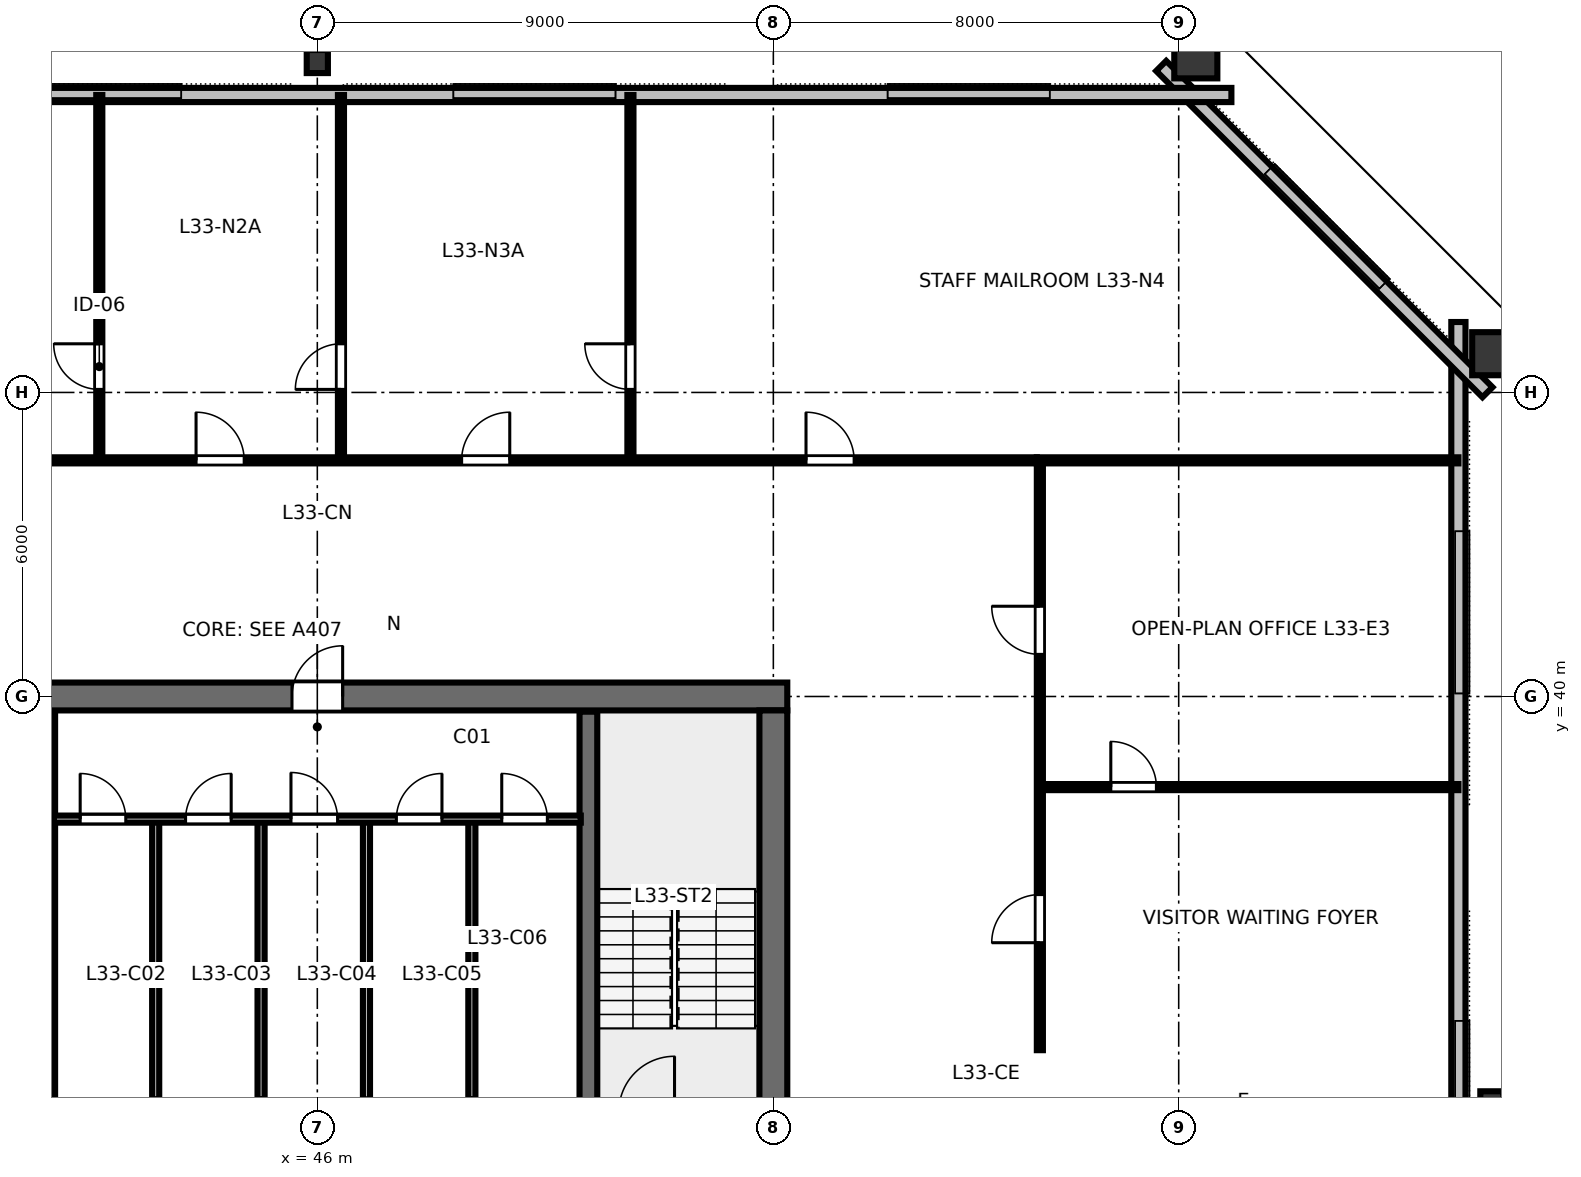
"""IFC4 building model, lengths in metres.
Left out: names, types, materials, properties, quantities, classifications, styles, units other than length and angle.
Written with IfcOpenShell. Run it as: python <this file> out.ifc"""

import sys

from ifc_helpers import new_model, si_unit, direction, frame, frame_2d, origin, origin_2d, place, context, subcontext, project, spatial, rectangle, hollow_rectangle, i_section, extrude, element, fill, save


model = new_model("IFC4")
c1 = context("Model", 3, precision=1e-05, world=origin(), true_north=direction((0.0, 1.0)))
c2 = subcontext(c1, "Body", "Model", "MODEL_VIEW")
j1 = project(units=[si_unit("LENGTHUNIT", "METRE"), si_unit("PLANEANGLEUNIT", "RADIAN")], contexts=[c1])
p1 = place(None, origin())
s1 = spatial("IfcSite", under=j1, at=p1, CompositionType="ELEMENT")
p2 = place(p1, origin())
s2 = spatial("IfcBuilding", under=s1, at=p2, CompositionType="ELEMENT")
p3 = place(p2, frame((0.0, 0.0, 127.6)))
s3 = spatial("IfcBuildingStorey", under=s2, at=p3, CompositionType="ELEMENT", Elevation=127.6)
p4 = place(p3, frame((36.725, 40.0, 0.0), z_axis=(0.0, 0.0, 1.0), x_axis=(1.0, 0.0, 0.0)))
e1 = element("IfcWall", 1, at=p4, inside=s3, PredefinedType="SHEAR", context=c2, shape_type="SweptSolid", body=[
    extrude(rectangle(XDim=18.55, YDim=0.55, at=frame_2d((9.275, 0.0))), origin(), (0.0, 0.0, 1.0), 3.36),
])
p5 = place(p4, frame((8.775, 0.0, 0.0)))
e2 = element("IfcOpeningElement", 2, at=p5, cuts=e1, PredefinedType="OPENING", context=c2, shape_type="SweptSolid", body=[
    extrude(rectangle(XDim=1.0, YDim=2.15, at=frame_2d((0.5, 1.075))), frame((0.0, 0.285, 0.0), z_axis=(0.0, -1.0, 0.0), x_axis=(1.0, 0.0, 0.0)), (0.0, 0.0, 1.0), 0.57),
])
p6 = place(p3, frame((55.0, 24.275, 0.0), z_axis=(0.0, 0.0, 1.0), x_axis=(0.0, 1.0, 0.0)))
e3 = element("IfcWall", 3, at=p6, inside=s3, PredefinedType="SHEAR", context=c2, shape_type="SweptSolid", body=[
    extrude(rectangle(XDim=15.45, YDim=0.55, at=frame_2d((7.725, 0.0))), origin(), (0.0, 0.0, 1.0), 3.36),
])
p7 = place(p6, frame((5.25, 0.0, 0.0)))
e4 = element("IfcOpeningElement", 4, at=p7, cuts=e3, PredefinedType="OPENING", context=c2, shape_type="SweptSolid", body=[
    extrude(rectangle(XDim=1.15, YDim=2.15, at=frame_2d((0.575, 1.075))), frame((0.0, 0.285, 0.0), z_axis=(0.0, -1.0, 0.0), x_axis=(1.0, 0.0, 0.0)), (0.0, 0.0, 1.0), 0.57),
])
p8 = place(p3, frame((69.18, 32.0, 0.0), z_axis=(0.0, 0.0, 1.0), x_axis=(0.0, 1.0, 0.0)))
e5 = element("IfcColumn", 5, at=p8, inside=s3, PredefinedType="COLUMN", context=c2, shape_type="SweptSolid", body=[
    extrude(i_section(OverallWidth=0.418, OverallDepth=0.455, WebThickness=0.042, FlangeThickness=0.068, FilletRadius=0.025, at=origin_2d()), origin(), (0.0, 0.0, 1.0), 3.358),
])
for number, where, z_axis, x_axis in (
    (6, (69.292, 46.764, 0.0), (0.0, 0.0, 1.0), (0.0, 1.0, 0.0)),
    (7, (63.338, 52.698, 0.0), (0.0, 0.0, 1.0), (1.0, 0.0, 0.0)),
):
    element("IfcColumn", number, at=place(p3, frame(where, z_axis=z_axis, x_axis=x_axis)), inside=s3, PredefinedType="COLUMN", context=c2, shape_type="SweptSolid", body=[
        extrude(hollow_rectangle(XDim=0.85, YDim=1.0, WallThickness=0.05, at=origin_2d()), origin(), (0.0, 0.0, 1.0), 3.358),
    ])
p9 = place(p3, frame((46.0, 52.53, 0.0), z_axis=(0.0, 0.0, 1.0), x_axis=(1.0, 0.0, 0.0)))
e8 = element("IfcColumn", 8, at=p9, inside=s3, PredefinedType="COLUMN", context=c2, shape_type="SweptSolid", body=[
    extrude(i_section(OverallWidth=0.418, OverallDepth=0.455, WebThickness=0.042, FlangeThickness=0.068, FilletRadius=0.025, at=origin_2d()), origin(), (0.0, 0.0, 1.0), 3.358),
])
p10 = place(p3, frame((68.52, 16.61, 0.0), z_axis=(0.0, 0.0, 1.0), x_axis=(0.0, 1.0, 0.0)))
e9 = element("IfcWall", 9, at=p10, inside=s3, PredefinedType="STANDARD", context=c2, shape_type="SweptSolid", body=[
    extrude(rectangle(XDim=30.78, YDim=0.28, at=frame_2d((15.39, 0.0))), origin(), (0.0, 0.0, 1.0), 3.36),
])
p11 = place(p3, frame((69.094, 46.004, 0.0), z_axis=(0.0, 0.0, 1.0), x_axis=(-0.707106781187, 0.707106781187, 0.0)))
e10 = element("IfcWall", 10, at=p11, inside=s3, PredefinedType="STANDARD", context=c2, shape_type="SweptSolid", body=[
    extrude(rectangle(XDim=9.107, YDim=0.28, at=frame_2d((4.553, 0.0))), origin(), (0.0, 0.0, 1.0), 3.36),
])
p12 = place(p3, frame((64.04, 51.87, 0.0), z_axis=(0.0, 0.0, 1.0), x_axis=(-1.0, 0.0, 0.0)))
e11 = element("IfcWall", 11, at=p12, inside=s3, PredefinedType="STANDARD", context=c2, shape_type="SweptSolid", body=[
    extrude(rectangle(XDim=36.08, YDim=0.28, at=frame_2d((18.04, 0.0))), origin(), (0.0, 0.0, 1.0), 3.36),
])
for number, where, z_axis, x_axis in (
    (12, (40.65, 32.0, 0.0), (0.0, 0.0, 1.0), (0.0, 1.0, 0.0)),
    (13, (51.35, 32.0, 0.0), (0.0, 0.0, 1.0), (0.0, 1.0, 0.0)),
):
    element("IfcWall", number, at=place(p3, frame(where, z_axis=z_axis, x_axis=x_axis)), inside=s3, PredefinedType="SHEAR", context=c2, shape_type="SweptSolid", body=[
        extrude(rectangle(XDim=7.7, YDim=0.35, at=frame_2d((3.85, 0.0))), origin(), (0.0, 0.0, 1.0), 3.6),
    ])
for number, where, z_axis, x_axis in (
    (14, (42.81, 32.05, 0.0), (0.0, 0.0, 1.0), (0.0, 1.0, 0.0)),
    (15, (44.89, 32.05, 0.0), (0.0, 0.0, 1.0), (0.0, 1.0, 0.0)),
    (16, (46.97, 32.05, 0.0), (0.0, 0.0, 1.0), (0.0, 1.0, 0.0)),
    (17, (49.05, 32.05, 0.0), (0.0, 0.0, 1.0), (0.0, 1.0, 0.0)),
):
    element("IfcWall", number, at=place(p3, frame(where, z_axis=z_axis, x_axis=x_axis)), inside=s3, PredefinedType="PARTITIONING", context=c2, shape_type="SweptSolid", body=[
        extrude(rectangle(XDim=5.5, YDim=0.14, at=frame_2d((2.75, 0.0))), origin(), (0.0, 0.0, 1.0), 3.36),
    ])
p13 = place(p3, frame((40.8, 37.58, 0.0), z_axis=(0.0, 0.0, 1.0), x_axis=(1.0, 0.0, 0.0)))
e18 = element("IfcWall", 18, at=p13, inside=s3, PredefinedType="PARTITIONING", context=c2, shape_type="SweptSolid", body=[
    extrude(rectangle(XDim=10.4, YDim=0.14, at=frame_2d((5.2, 0.0))), origin(), (0.0, 0.0, 1.0), 3.36),
])
p14 = place(p13, frame((0.52, 0.0, 0.0)))
e19 = element("IfcOpeningElement", 19, at=p14, cuts=e18, PredefinedType="OPENING", context=c2, shape_type="SweptSolid", body=[
    extrude(rectangle(XDim=0.9, YDim=2.15, at=frame_2d((0.45, 1.075))), frame((0.0, 0.08, 0.0), z_axis=(0.0, -1.0, 0.0), x_axis=(1.0, 0.0, 0.0)), (0.0, 0.0, 1.0), 0.16),
])
p15 = place(p13, frame((2.6, 0.0, 0.0)))
e20 = element("IfcOpeningElement", 20, at=p15, cuts=e18, PredefinedType="OPENING", context=c2, shape_type="SweptSolid", body=[
    extrude(rectangle(XDim=0.9, YDim=2.15, at=frame_2d((0.45, 1.075))), frame((0.0, 0.08, 0.0), z_axis=(0.0, -1.0, 0.0), x_axis=(1.0, 0.0, 0.0)), (0.0, 0.0, 1.0), 0.16),
])
p16 = place(p13, frame((4.68, 0.0, 0.0)))
e21 = element("IfcOpeningElement", 21, at=p16, cuts=e18, PredefinedType="OPENING", context=c2, shape_type="SweptSolid", body=[
    extrude(rectangle(XDim=0.92, YDim=2.15, at=frame_2d((0.46, 1.075))), frame((0.0, 0.08, 0.0), z_axis=(0.0, -1.0, 0.0), x_axis=(1.0, 0.0, 0.0)), (0.0, 0.0, 1.0), 0.16),
])
p17 = place(p13, frame((6.76, 0.0, 0.0)))
e22 = element("IfcOpeningElement", 22, at=p17, cuts=e18, PredefinedType="OPENING", context=c2, shape_type="SweptSolid", body=[
    extrude(rectangle(XDim=0.9, YDim=2.15, at=frame_2d((0.45, 1.075))), frame((0.0, 0.08, 0.0), z_axis=(0.0, -1.0, 0.0), x_axis=(1.0, 0.0, 0.0)), (0.0, 0.0, 1.0), 0.16),
])
p18 = place(p13, frame((8.84, 0.0, 0.0)))
e23 = element("IfcOpeningElement", 23, at=p18, cuts=e18, PredefinedType="OPENING", context=c2, shape_type="SweptSolid", body=[
    extrude(rectangle(XDim=0.9, YDim=2.15, at=frame_2d((0.45, 1.075))), frame((0.0, 0.08, 0.0), z_axis=(0.0, -1.0, 0.0), x_axis=(1.0, 0.0, 0.0)), (0.0, 0.0, 1.0), 0.16),
])
p19 = place(p3, frame((41.697, 44.66, 0.0), z_axis=(0.0, 0.0, 1.0), x_axis=(0.0, 1.0, 0.0)))
e24 = element("IfcWall", 24, at=p19, inside=s3, PredefinedType="PARTITIONING", context=c2, shape_type="SweptSolid", body=[
    extrude(rectangle(XDim=7.21, YDim=0.12, at=frame_2d((3.605, 0.0))), origin(), (0.0, 0.0, 1.0), 2.64),
])
p20 = place(p19, frame((1.4, 0.0, 0.0)))
e25 = element("IfcOpeningElement", 25, at=p20, cuts=e24, PredefinedType="OPENING", context=c2, shape_type="SweptSolid", body=[
    extrude(rectangle(XDim=0.9, YDim=2.15, at=frame_2d((0.45, 1.075))), frame((0.0, 0.07, 0.0), z_axis=(0.0, -1.0, 0.0), x_axis=(1.0, 0.0, 0.0)), (0.0, 0.0, 1.0), 0.14),
])
p21 = place(p3, frame((46.467, 44.66, 0.0), z_axis=(0.0, 0.0, 1.0), x_axis=(0.0, 1.0, 0.0)))
e26 = element("IfcWall", 26, at=p21, inside=s3, PredefinedType="PARTITIONING", context=c2, shape_type="SweptSolid", body=[
    extrude(rectangle(XDim=7.21, YDim=0.12, at=frame_2d((3.605, 0.0))), origin(), (0.0, 0.0, 1.0), 2.64),
])
p22 = place(p21, frame((1.4, 0.0, 0.0)))
e27 = element("IfcOpeningElement", 27, at=p22, cuts=e26, PredefinedType="OPENING", context=c2, shape_type="SweptSolid", body=[
    extrude(rectangle(XDim=0.9, YDim=2.15, at=frame_2d((0.45, 1.075))), frame((0.0, 0.07, 0.0), z_axis=(0.0, -1.0, 0.0), x_axis=(1.0, 0.0, 0.0)), (0.0, 0.0, 1.0), 0.14),
])
p23 = place(p3, frame((52.179, 44.66, 0.0), z_axis=(0.0, 0.0, 1.0), x_axis=(0.0, 1.0, 0.0)))
e28 = element("IfcWall", 28, at=p23, inside=s3, PredefinedType="PARTITIONING", context=c2, shape_type="SweptSolid", body=[
    extrude(rectangle(XDim=7.21, YDim=0.12, at=frame_2d((3.605, 0.0))), origin(), (0.0, 0.0, 1.0), 2.64),
])
p24 = place(p23, frame((1.4, 0.0, 0.0)))
e29 = element("IfcOpeningElement", 29, at=p24, cuts=e28, PredefinedType="OPENING", context=c2, shape_type="SweptSolid", body=[
    extrude(rectangle(XDim=0.9, YDim=2.15, at=frame_2d((0.45, 1.075))), frame((0.0, 0.07, 0.0), z_axis=(0.0, -1.0, 0.0), x_axis=(1.0, 0.0, 0.0)), (0.0, 0.0, 1.0), 0.14),
])
p25 = place(p3, frame((31.8, 44.66, 0.0), z_axis=(0.0, 0.0, 1.0), x_axis=(1.0, 0.0, 0.0)))
e30 = element("IfcWall", 30, at=p25, inside=s3, PredefinedType="PARTITIONING", context=c2, shape_type="SweptSolid", body=[
    extrude(rectangle(XDim=28.4, YDim=0.12, at=frame_2d((14.2, 0.0))), origin(), (0.0, 0.0, 1.0), 2.64),
])
p26 = place(p25, frame((4.544, 0.0, 0.0)))
e31 = element("IfcOpeningElement", 31, at=p26, cuts=e30, PredefinedType="OPENING", context=c2, shape_type="SweptSolid", body=[
    extrude(rectangle(XDim=0.95, YDim=2.15, at=frame_2d((0.475, 1.075))), frame((0.0, 0.07, 0.0), z_axis=(0.0, -1.0, 0.0), x_axis=(1.0, 0.0, 0.0)), (0.0, 0.0, 1.0), 0.14),
])
p27 = place(p25, frame((11.807, 0.0, 0.0)))
e32 = element("IfcOpeningElement", 32, at=p27, cuts=e30, PredefinedType="OPENING", context=c2, shape_type="SweptSolid", body=[
    extrude(rectangle(XDim=0.95, YDim=2.15, at=frame_2d((0.475, 1.075))), frame((0.0, 0.07, 0.0), z_axis=(0.0, -1.0, 0.0), x_axis=(1.0, 0.0, 0.0)), (0.0, 0.0, 1.0), 0.14),
])
p28 = place(p25, frame((17.048, 0.0, 0.0)))
e33 = element("IfcOpeningElement", 33, at=p28, cuts=e30, PredefinedType="OPENING", context=c2, shape_type="SweptSolid", body=[
    extrude(rectangle(XDim=0.95, YDim=2.15, at=frame_2d((0.475, 1.075))), frame((0.0, 0.07, 0.0), z_axis=(0.0, -1.0, 0.0), x_axis=(1.0, 0.0, 0.0)), (0.0, 0.0, 1.0), 0.14),
])
p29 = place(p25, frame((23.845, 0.0, 0.0)))
e34 = element("IfcOpeningElement", 34, at=p29, cuts=e30, PredefinedType="OPENING", context=c2, shape_type="SweptSolid", body=[
    extrude(rectangle(XDim=0.95, YDim=2.15, at=frame_2d((0.475, 1.075))), frame((0.0, 0.07, 0.0), z_axis=(0.0, -1.0, 0.0), x_axis=(1.0, 0.0, 0.0)), (0.0, 0.0, 1.0), 0.14),
])
p30 = place(p3, frame((60.26, 38.212, 0.0), z_axis=(0.0, 0.0, 1.0), x_axis=(1.0, 0.0, 0.0)))
e35 = element("IfcWall", 35, at=p30, inside=s3, PredefinedType="PARTITIONING", context=c2, shape_type="SweptSolid", body=[
    extrude(rectangle(XDim=8.26, YDim=0.12, at=frame_2d((4.13, 0.0))), origin(), (0.0, 0.0, 1.0), 2.64),
])
p31 = place(p30, frame((1.4, 0.0, 0.0)))
e36 = element("IfcOpeningElement", 36, at=p31, cuts=e35, PredefinedType="OPENING", context=c2, shape_type="SweptSolid", body=[
    extrude(rectangle(XDim=0.9, YDim=2.15, at=frame_2d((0.45, 1.075))), frame((0.0, 0.07, 0.0), z_axis=(0.0, -1.0, 0.0), x_axis=(1.0, 0.0, 0.0)), (0.0, 0.0, 1.0), 0.14),
])
p32 = place(p3, frame((60.26, 33.02, 0.0), z_axis=(0.0, 0.0, 1.0), x_axis=(0.0, 1.0, 0.0)))
e37 = element("IfcWall", 37, at=p32, inside=s3, PredefinedType="PARTITIONING", context=c2, shape_type="SweptSolid", body=[
    extrude(rectangle(XDim=11.58, YDim=0.12, at=frame_2d((5.79, 0.0))), origin(), (0.0, 0.0, 1.0), 2.64),
])
p33 = place(p32, frame((2.121, 0.0, 0.0)))
e38 = element("IfcOpeningElement", 38, at=p33, cuts=e37, PredefinedType="OPENING", context=c2, shape_type="SweptSolid", body=[
    extrude(rectangle(XDim=0.95, YDim=2.15, at=frame_2d((0.475, 1.075))), frame((0.0, 0.07, 0.0), z_axis=(0.0, -1.0, 0.0), x_axis=(1.0, 0.0, 0.0)), (0.0, 0.0, 1.0), 0.14),
])
p34 = place(p32, frame((7.811, 0.0, 0.0)))
e39 = element("IfcOpeningElement", 39, at=p34, cuts=e37, PredefinedType="OPENING", context=c2, shape_type="SweptSolid", body=[
    extrude(rectangle(XDim=0.95, YDim=2.15, at=frame_2d((0.475, 1.075))), frame((0.0, 0.07, 0.0), z_axis=(0.0, -1.0, 0.0), x_axis=(1.0, 0.0, 0.0)), (0.0, 0.0, 1.0), 0.14),
])
p35 = place(p3, frame((60.2, 44.66, 0.0), z_axis=(0.0, 0.0, 1.0), x_axis=(1.0, 0.0, 0.0)))
e40 = element("IfcWall", 40, at=p35, inside=s3, PredefinedType="PARTITIONING", context=c2, shape_type="SweptSolid", body=[
    extrude(rectangle(XDim=8.32, YDim=0.12, at=frame_2d((4.16, 0.0))), origin(), (0.0, 0.0, 1.0), 2.64),
])
p36 = place(p5, origin())
e41 = element("IfcDoor", 41, at=p36, inside=s3, OperationType="SINGLE_SWING_RIGHT", PredefinedType="DOOR", context=c2, shape_type="SweptSolid", body=[
    extrude(rectangle(XDim=1.0, YDim=2.15, at=frame_2d((0.5, 1.075))), frame((0.0, 0.025, 0.0), z_axis=(0.0, -1.0, 0.0), x_axis=(1.0, 0.0, 0.0)), (0.0, 0.0, 1.0), 0.05),
])
fill(e2, e41)
p37 = place(p14, origin())
e42 = element("IfcDoor", 42, at=p37, inside=s3, OperationType="SINGLE_SWING_LEFT", PredefinedType="DOOR", context=c2, shape_type="SweptSolid", body=[
    extrude(rectangle(XDim=0.9, YDim=2.15, at=frame_2d((0.45, 1.075))), frame((0.0, 0.025, 0.0), z_axis=(0.0, -1.0, 0.0), x_axis=(1.0, 0.0, 0.0)), (0.0, 0.0, 1.0), 0.05),
])
fill(e19, e42)
p38 = place(p15, origin())
e43 = element("IfcDoor", 43, at=p38, inside=s3, OperationType="SINGLE_SWING_RIGHT", PredefinedType="DOOR", context=c2, shape_type="SweptSolid", body=[
    extrude(rectangle(XDim=0.9, YDim=2.15, at=frame_2d((0.45, 1.075))), frame((0.0, 0.025, 0.0), z_axis=(0.0, -1.0, 0.0), x_axis=(1.0, 0.0, 0.0)), (0.0, 0.0, 1.0), 0.05),
])
fill(e20, e43)
p39 = place(p16, origin())
e44 = element("IfcDoor", 44, at=p39, inside=s3, OperationType="SINGLE_SWING_LEFT", PredefinedType="DOOR", context=c2, shape_type="SweptSolid", body=[
    extrude(rectangle(XDim=0.92, YDim=2.15, at=frame_2d((0.46, 1.075))), frame((0.0, 0.025, 0.0), z_axis=(0.0, -1.0, 0.0), x_axis=(1.0, 0.0, 0.0)), (0.0, 0.0, 1.0), 0.05),
])
fill(e21, e44)
p40 = place(p17, origin())
e45 = element("IfcDoor", 45, at=p40, inside=s3, OperationType="SINGLE_SWING_RIGHT", PredefinedType="DOOR", context=c2, shape_type="SweptSolid", body=[
    extrude(rectangle(XDim=0.9, YDim=2.15, at=frame_2d((0.45, 1.075))), frame((0.0, 0.025, 0.0), z_axis=(0.0, -1.0, 0.0), x_axis=(1.0, 0.0, 0.0)), (0.0, 0.0, 1.0), 0.05),
])
fill(e22, e45)
p41 = place(p18, origin())
e46 = element("IfcDoor", 46, at=p41, inside=s3, OperationType="SINGLE_SWING_LEFT", PredefinedType="DOOR", context=c2, shape_type="SweptSolid", body=[
    extrude(rectangle(XDim=0.9, YDim=2.15, at=frame_2d((0.45, 1.075))), frame((0.0, 0.025, 0.0), z_axis=(0.0, -1.0, 0.0), x_axis=(1.0, 0.0, 0.0)), (0.0, 0.0, 1.0), 0.05),
])
fill(e23, e46)
p42 = place(p20, origin())
e47 = element("IfcDoor", 47, at=p42, inside=s3, OperationType="SINGLE_SWING_RIGHT", PredefinedType="DOOR", context=c2, shape_type="SweptSolid", body=[
    extrude(rectangle(XDim=0.9, YDim=2.15, at=frame_2d((0.45, 1.075))), frame((0.0, 0.025, 0.0), z_axis=(0.0, -1.0, 0.0), x_axis=(1.0, 0.0, 0.0)), (0.0, 0.0, 1.0), 0.05),
])
fill(e25, e47)
p43 = place(p22, origin())
e48 = element("IfcDoor", 48, at=p43, inside=s3, OperationType="SINGLE_SWING_LEFT", PredefinedType="DOOR", context=c2, shape_type="SweptSolid", body=[
    extrude(rectangle(XDim=0.9, YDim=2.15, at=frame_2d((0.45, 1.075))), frame((0.0, 0.025, 0.0), z_axis=(0.0, -1.0, 0.0), x_axis=(1.0, 0.0, 0.0)), (0.0, 0.0, 1.0), 0.05),
])
fill(e27, e48)
p44 = place(p24, origin())
e49 = element("IfcDoor", 49, at=p44, inside=s3, OperationType="SINGLE_SWING_RIGHT", PredefinedType="DOOR", context=c2, shape_type="SweptSolid", body=[
    extrude(rectangle(XDim=0.9, YDim=2.15, at=frame_2d((0.45, 1.075))), frame((0.0, 0.025, 0.0), z_axis=(0.0, -1.0, 0.0), x_axis=(1.0, 0.0, 0.0)), (0.0, 0.0, 1.0), 0.05),
])
fill(e29, e49)
p45 = place(p27, origin())
e50 = element("IfcDoor", 50, at=p45, inside=s3, OperationType="SINGLE_SWING_LEFT", PredefinedType="DOOR", context=c2, shape_type="SweptSolid", body=[
    extrude(rectangle(XDim=0.95, YDim=2.15, at=frame_2d((0.475, 1.075))), frame((0.0, 0.025, 0.0), z_axis=(0.0, -1.0, 0.0), x_axis=(1.0, 0.0, 0.0)), (0.0, 0.0, 1.0), 0.05),
])
fill(e32, e50)
p46 = place(p28, origin())
e51 = element("IfcDoor", 51, at=p46, inside=s3, OperationType="SINGLE_SWING_RIGHT", PredefinedType="DOOR", context=c2, shape_type="SweptSolid", body=[
    extrude(rectangle(XDim=0.95, YDim=2.15, at=frame_2d((0.475, 1.075))), frame((0.0, 0.025, 0.0), z_axis=(0.0, -1.0, 0.0), x_axis=(1.0, 0.0, 0.0)), (0.0, 0.0, 1.0), 0.05),
])
fill(e33, e51)
p47 = place(p29, origin())
e52 = element("IfcDoor", 52, at=p47, inside=s3, OperationType="SINGLE_SWING_LEFT", PredefinedType="DOOR", context=c2, shape_type="SweptSolid", body=[
    extrude(rectangle(XDim=0.95, YDim=2.15, at=frame_2d((0.475, 1.075))), frame((0.0, 0.025, 0.0), z_axis=(0.0, -1.0, 0.0), x_axis=(1.0, 0.0, 0.0)), (0.0, 0.0, 1.0), 0.05),
])
fill(e34, e52)
p48 = place(p31, origin())
e53 = element("IfcDoor", 53, at=p48, inside=s3, OperationType="SINGLE_SWING_LEFT", PredefinedType="DOOR", context=c2, shape_type="SweptSolid", body=[
    extrude(rectangle(XDim=0.9, YDim=2.15, at=frame_2d((0.45, 1.075))), frame((0.0, 0.025, 0.0), z_axis=(0.0, -1.0, 0.0), x_axis=(1.0, 0.0, 0.0)), (0.0, 0.0, 1.0), 0.05),
])
fill(e36, e53)
p49 = place(p33, origin())
e54 = element("IfcDoor", 54, at=p49, inside=s3, OperationType="SINGLE_SWING_LEFT", PredefinedType="DOOR", context=c2, shape_type="SweptSolid", body=[
    extrude(rectangle(XDim=0.95, YDim=2.15, at=frame_2d((0.475, 1.075))), frame((0.0, 0.025, 0.0), z_axis=(0.0, -1.0, 0.0), x_axis=(1.0, 0.0, 0.0)), (0.0, 0.0, 1.0), 0.05),
])
fill(e38, e54)
p50 = place(p34, origin())
e55 = element("IfcDoor", 55, at=p50, inside=s3, OperationType="SINGLE_SWING_RIGHT", PredefinedType="DOOR", context=c2, shape_type="SweptSolid", body=[
    extrude(rectangle(XDim=0.95, YDim=2.15, at=frame_2d((0.475, 1.075))), frame((0.0, 0.025, 0.0), z_axis=(0.0, -1.0, 0.0), x_axis=(1.0, 0.0, 0.0)), (0.0, 0.0, 1.0), 0.05),
])
fill(e39, e55)
save(model, sys.argv[1])
